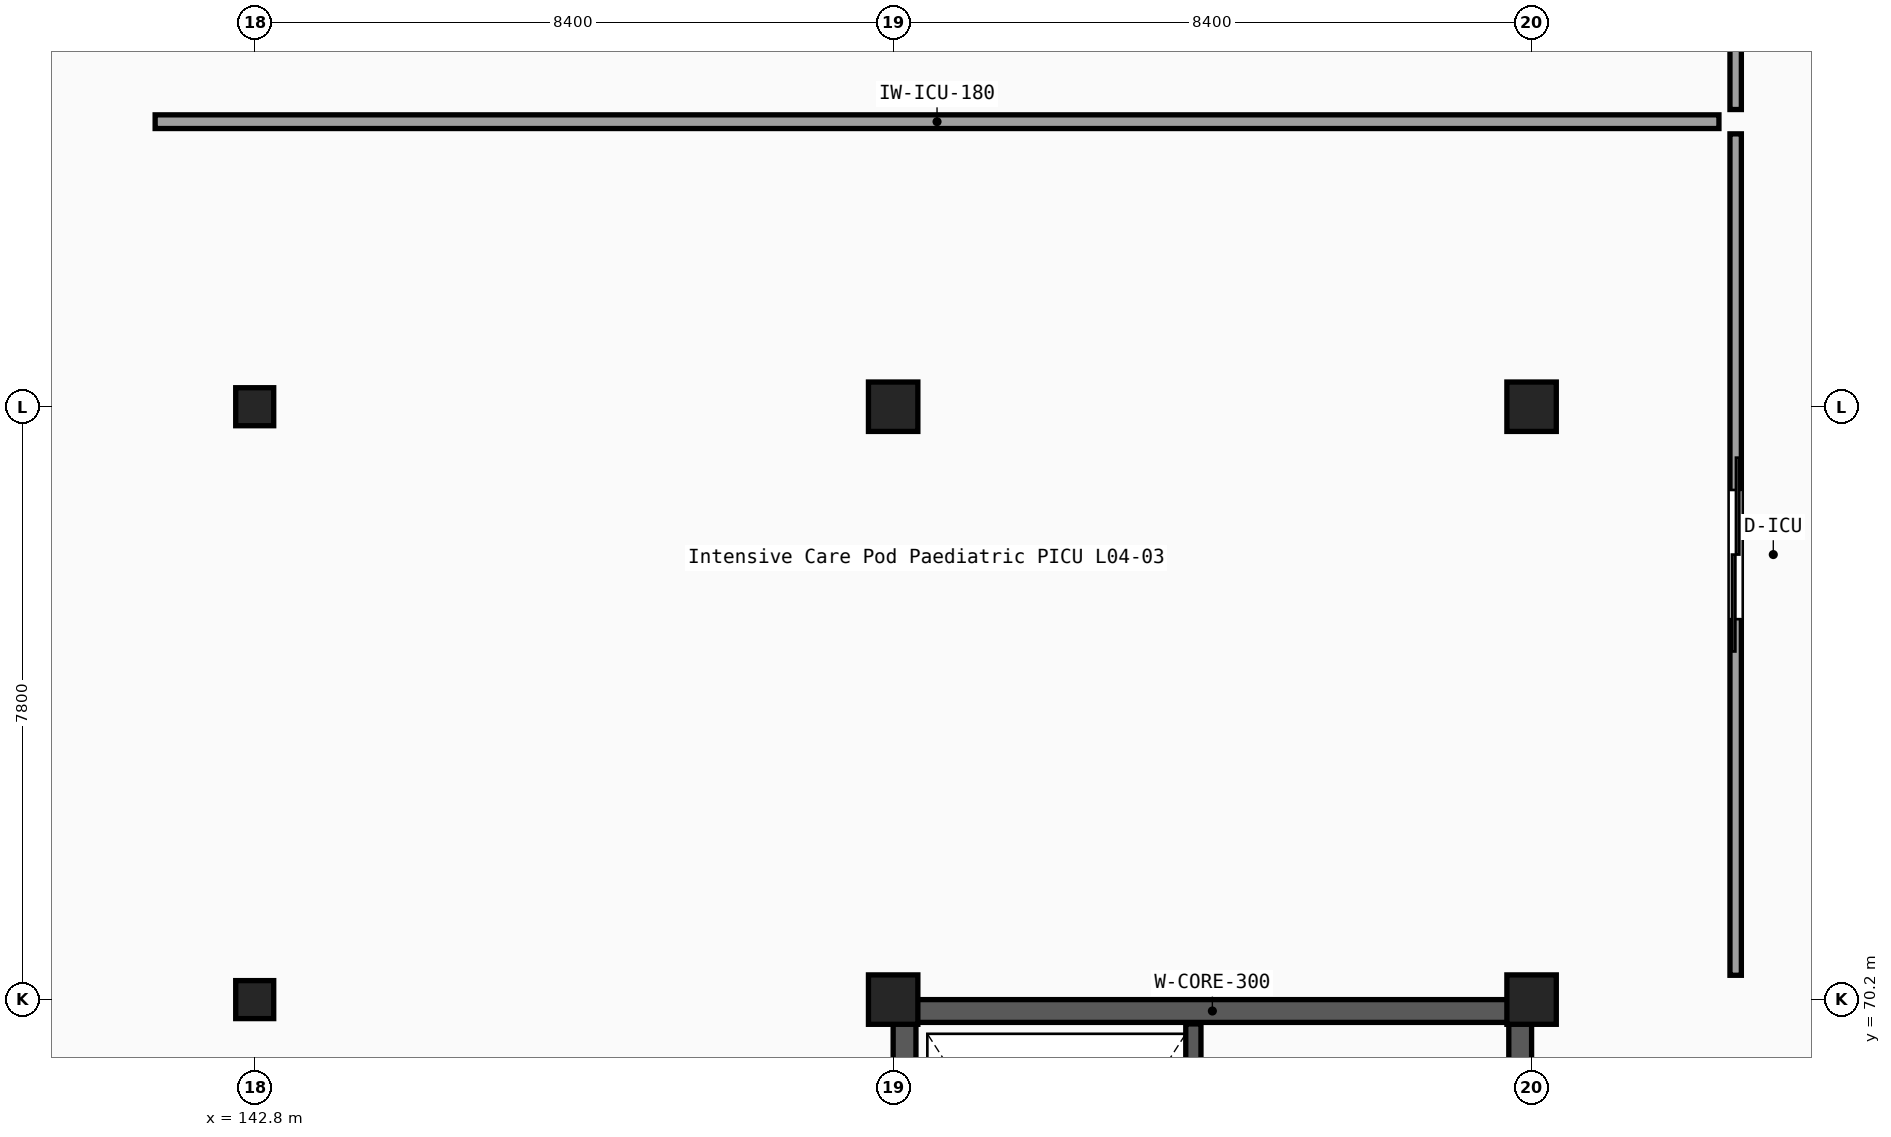
"""IFC4 building model, lengths in metres.
Left out: names, types, materials, properties, quantities, classifications, styles, units other than length and angle.
Written with IfcOpenShell. Run it as: python <this file> out.ifc"""

import sys

from ifc_helpers import new_model, si_unit, direction, frame, frame_2d, origin, origin_2d, place, context, subcontext, project, spatial, rectangle, i_section, extrude, element, fill, save


model = new_model("IFC4")
c1 = context("Model", 3, precision=1e-05, world=origin(), true_north=direction((0.0, 1.0)))
c2 = subcontext(c1, "Body", "Model", "MODEL_VIEW")
j1 = project(units=[si_unit("LENGTHUNIT", "METRE"), si_unit("PLANEANGLEUNIT", "RADIAN")], contexts=[c1])
p1 = place(None, origin())
s1 = spatial("IfcSite", under=j1, at=p1, CompositionType="ELEMENT")
p2 = place(p1, origin())
s2 = spatial("IfcBuilding", under=s1, at=p2, CompositionType="ELEMENT")
p3 = place(p2, frame((0.0, 0.0, 18.9)))
s3 = spatial("IfcBuildingStorey", under=s2, at=p3, CompositionType="ELEMENT", Elevation=18.9)
for number, where, z_axis, x_axis in (
    (1, (142.8, 70.2, 0.0), (0.0, 0.0, 1.0), (1.0, 0.0, 0.0)),
    (2, (142.8, 78.0, 0.0), (0.0, 0.0, 1.0), (1.0, 0.0, 0.0)),
):
    element("IfcColumn", number, at=place(p3, frame(where, z_axis=z_axis, x_axis=x_axis)), inside=s3, PredefinedType="COLUMN", context=c2, shape_type="SweptSolid", body=[
        extrude(i_section(OverallWidth=0.3, OverallDepth=0.5, WebThickness=0.014, FlangeThickness=0.028, FilletRadius=0.027, at=origin_2d()), origin(), (0.0, 0.0, 1.0), 4.05),
    ])
for number, where, z_axis, x_axis in (
    (3, (151.2, 70.2, 0.0), (0.0, 0.0, 1.0), (1.0, 0.0, 0.0)),
    (4, (151.2, 78.0, 0.0), (0.0, 0.0, 1.0), (1.0, 0.0, 0.0)),
    (5, (159.6, 70.2, 0.0), (0.0, 0.0, 1.0), (1.0, 0.0, 0.0)),
    (6, (159.6, 78.0, 0.0), (0.0, 0.0, 1.0), (1.0, 0.0, 0.0)),
):
    element("IfcColumn", number, at=place(p3, frame(where, z_axis=z_axis, x_axis=x_axis)), inside=s3, PredefinedType="COLUMN", context=c2, shape_type="SweptSolid", body=[
        extrude(rectangle(XDim=0.65, YDim=0.65, at=origin_2d()), origin(), (0.0, 0.0, 1.0), 4.05),
    ])
p4 = place(p3, frame((151.2, 70.05, 0.0), z_axis=(0.0, 0.0, 1.0), x_axis=(1.0, 0.0, 0.0)))
e7 = element("IfcWall", 7, at=p4, inside=s3, PredefinedType="SHEAR", context=c2, shape_type="SweptSolid", body=[
    extrude(rectangle(XDim=8.4, YDim=0.3, at=frame_2d((4.2, 0.0))), origin(), (0.0, 0.0, 1.0), 3.82),
])
for number, where, z_axis, x_axis in (
    (8, (151.35, 62.7, 0.0), (0.0, 0.0, 1.0), (0.0, 1.0, 0.0)),
    (9, (159.45, 62.7, 0.0), (0.0, 0.0, 1.0), (0.0, 1.0, 0.0)),
):
    element("IfcWall", number, at=place(p3, frame(where, z_axis=z_axis, x_axis=x_axis)), inside=s3, PredefinedType="SHEAR", context=c2, shape_type="SweptSolid", body=[
        extrude(rectangle(XDim=7.2, YDim=0.3, at=frame_2d((3.6, 0.0))), origin(), (0.0, 0.0, 1.0), 3.82),
    ])
p5 = place(p3, frame((155.15, 62.72, 0.0), z_axis=(0.0, 0.0, 1.0), x_axis=(0.0, 1.0, 0.0)))
e10 = element("IfcWall", 10, at=p5, inside=s3, PredefinedType="SHEAR", context=c2, shape_type="SweptSolid", body=[
    extrude(rectangle(XDim=7.16, YDim=0.2, at=frame_2d((3.58, 0.0))), origin(), (0.0, 0.0, 1.0), 3.82),
])
p6 = place(p3, frame((162.285, 70.52, 0.0), z_axis=(0.0, 0.0, 1.0), x_axis=(0.0, 1.0, 0.0)))
e11 = element("IfcWall", 11, at=p6, inside=s3, PredefinedType="PARTITIONING", context=c2, shape_type="SweptSolid", body=[
    extrude(rectangle(XDim=11.07, YDim=0.15, at=frame_2d((5.535, 0.0))), origin(), (0.0, 0.0, 1.0), 3.25),
])
p7 = place(p6, frame((4.685, 0.0, 0.0)))
e12 = element("IfcOpeningElement", 12, at=p7, cuts=e11, PredefinedType="OPENING", context=c2, shape_type="SweptSolid", body=[
    extrude(rectangle(XDim=1.7, YDim=2.3, at=frame_2d((0.85, 1.15))), frame((0.0, 0.085, 0.0), z_axis=(0.0, -1.0, 0.0), x_axis=(1.0, 0.0, 0.0)), (0.0, 0.0, 1.0), 0.17),
])
p8 = place(p3, frame((141.49, 81.75, 0.0), z_axis=(0.0, 0.0, 1.0), x_axis=(1.0, 0.0, 0.0)))
e13 = element("IfcWall", 13, at=p8, inside=s3, PredefinedType="PARTITIONING", context=c2, shape_type="SweptSolid", body=[
    extrude(rectangle(XDim=20.575, YDim=0.18, at=frame_2d((10.288, 0.0))), origin(), (0.0, 0.0, 1.0), 3.53),
])
p9 = place(p3, frame((162.285, 81.91, 0.0), z_axis=(0.0, 0.0, 1.0), x_axis=(0.0, 1.0, 0.0)))
e14 = element("IfcWall", 14, at=p9, inside=s3, PredefinedType="PARTITIONING", context=c2, shape_type="SweptSolid", body=[
    extrude(rectangle(XDim=11.07, YDim=0.15, at=frame_2d((5.535, 0.0))), origin(), (0.0, 0.0, 1.0), 3.52),
])
p10 = place(p9, frame((5.01, 0.0, 0.0)))
e15 = element("IfcOpeningElement", 15, at=p10, cuts=e14, PredefinedType="OPENING", context=c2, shape_type="SweptSolid", body=[
    extrude(rectangle(XDim=1.05, YDim=2.15, at=frame_2d((0.525, 1.075))), frame((0.0, 0.085, 0.0), z_axis=(0.0, -1.0, 0.0), x_axis=(1.0, 0.0, 0.0)), (0.0, 0.0, 1.0), 0.17),
])
p11 = place(p7, origin())
e16 = element("IfcDoor", 16, at=p11, inside=s3, OperationType="DOUBLE_DOOR_SLIDING", PredefinedType="DOOR", context=c2, shape_type="SweptSolid", body=[
    extrude(rectangle(XDim=1.7, YDim=2.3, at=frame_2d((0.85, 1.15))), frame((0.0, 0.025, 0.0), z_axis=(0.0, -1.0, 0.0), x_axis=(1.0, 0.0, 0.0)), (0.0, 0.0, 1.0), 0.05),
])
fill(e12, e16)
save(model, sys.argv[1])
